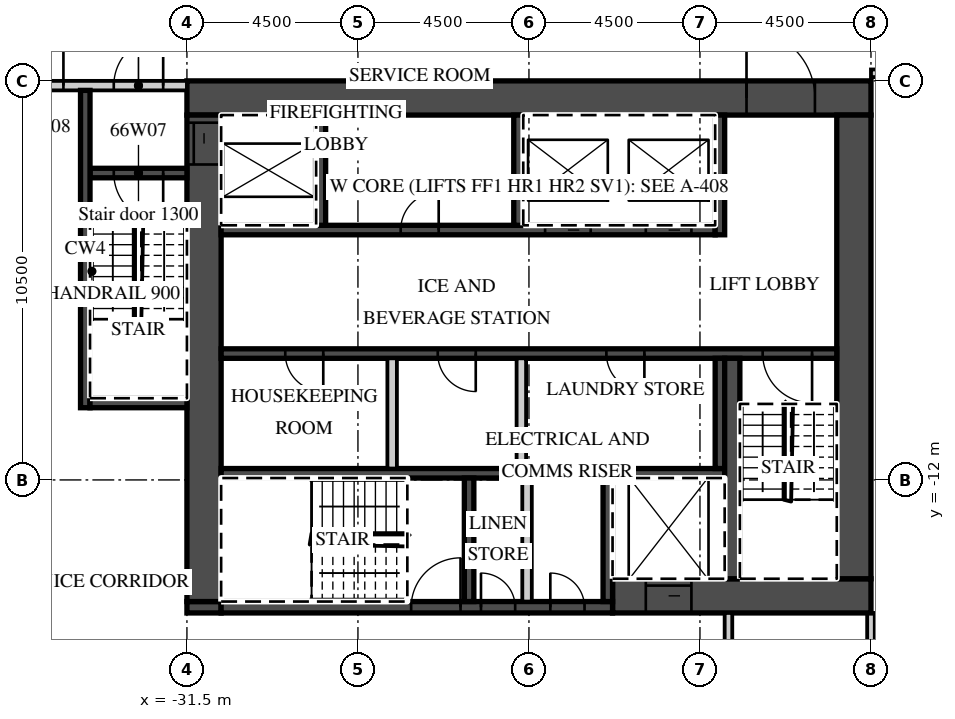
"""IFC4 building model, lengths in metres.
Left out: names, types, materials, properties, quantities, classifications, styles, units other than length and angle.
Written with IfcOpenShell. Run it as: python <this file> out.ifc"""

import sys

from ifc_helpers import new_model, si_unit, direction, frame, frame_2d, origin, place, context, subcontext, project, spatial, rectangle, extrude, element, fill, save


model = new_model("IFC4")
c1 = context("Model", 3, precision=1e-05, world=origin(), true_north=direction((0.0, 1.0)))
c2 = subcontext(c1, "Body", "Model", "MODEL_VIEW")
j1 = project(units=[si_unit("LENGTHUNIT", "METRE"), si_unit("PLANEANGLEUNIT", "RADIAN")], contexts=[c1])
p1 = place(None, origin())
s1 = spatial("IfcSite", under=j1, at=p1, CompositionType="ELEMENT")
p2 = place(p1, origin())
s2 = spatial("IfcBuilding", under=s1, at=p2, CompositionType="ELEMENT")
p3 = place(p2, frame((0.0, 0.0, 268.5)))
s3 = spatial("IfcBuildingStorey", under=s2, at=p3, CompositionType="ELEMENT", Elevation=268.5)
p4 = place(p3, frame((-13.5, -21.396, 0.0), z_axis=(0.0, 0.0, 1.0), x_axis=(0.0, 1.0, 0.0)))
e1 = element("IfcWall", 1, at=p4, inside=s3, PredefinedType="PARTITIONING", context=c2, shape_type="SweptSolid", body=[
    extrude(rectangle(XDim=5.896, YDim=0.2, at=frame_2d((2.948, 0.0))), origin(), (0.0, 0.0, 1.0), 3.02),
])
p5 = place(p3, frame((-13.5, -1.3, 0.0), z_axis=(0.0, 0.0, 1.0), x_axis=(1.0, 0.0, 0.0)))
e2 = element("IfcWall", 2, at=p5, inside=s3, PredefinedType="PARTITIONING", context=c2, shape_type="SweptSolid", body=[
    extrude(rectangle(XDim=50.293, YDim=0.2, at=frame_2d((25.146, 0.0))), origin(), (0.0, 0.0, 1.0), 3.02),
])
p6 = place(p5, frame((0.575, 0.0, 0.0)))
e3 = element("IfcOpeningElement", 3, at=p6, cuts=e2, PredefinedType="OPENING", context=c2, shape_type="SweptSolid", body=[
    extrude(rectangle(XDim=1.0, YDim=2.1, at=frame_2d((0.5, 1.05))), frame((0.0, 0.11, 0.0), z_axis=(0.0, -1.0, 0.0), x_axis=(1.0, 0.0, 0.0)), (0.0, 0.0, 1.0), 0.22),
])
p7 = place(p5, frame((6.938, 0.0, 0.0)))
e4 = element("IfcOpeningElement", 4, at=p7, cuts=e2, PredefinedType="OPENING", context=c2, shape_type="SweptSolid", body=[
    extrude(rectangle(XDim=1.2, YDim=2.1, at=frame_2d((0.6, 1.05))), frame((0.0, 0.11, 0.0), z_axis=(0.0, -1.0, 0.0), x_axis=(1.0, 0.0, 0.0)), (0.0, 0.0, 1.0), 0.22),
])
p8 = place(p5, frame((18.862, 0.0, 0.0)))
e5 = element("IfcOpeningElement", 5, at=p8, cuts=e2, PredefinedType="OPENING", context=c2, shape_type="SweptSolid", body=[
    extrude(rectangle(XDim=1.2, YDim=2.1, at=frame_2d((0.6, 1.05))), frame((0.0, 0.11, 0.0), z_axis=(0.0, -1.0, 0.0), x_axis=(1.0, 0.0, 0.0)), (0.0, 0.0, 1.0), 0.22),
])
p9 = place(p5, frame((24.938, 0.0, 0.0)))
e6 = element("IfcOpeningElement", 6, at=p9, cuts=e2, PredefinedType="OPENING", context=c2, shape_type="SweptSolid", body=[
    extrude(rectangle(XDim=1.2, YDim=2.1, at=frame_2d((0.6, 1.05))), frame((0.0, 0.11, 0.0), z_axis=(0.0, -1.0, 0.0), x_axis=(1.0, 0.0, 0.0)), (0.0, 0.0, 1.0), 0.22),
])
p10 = place(p5, frame((36.862, 0.0, 0.0)))
e7 = element("IfcOpeningElement", 7, at=p10, cuts=e2, PredefinedType="OPENING", context=c2, shape_type="SweptSolid", body=[
    extrude(rectangle(XDim=1.2, YDim=2.1, at=frame_2d((0.6, 1.05))), frame((0.0, 0.11, 0.0), z_axis=(0.0, -1.0, 0.0), x_axis=(1.0, 0.0, 0.0)), (0.0, 0.0, 1.0), 0.22),
])
p11 = place(p5, frame((43.45, 0.0, 0.0)))
e8 = element("IfcOpeningElement", 8, at=p11, cuts=e2, PredefinedType="OPENING", context=c2, shape_type="SweptSolid", body=[
    extrude(rectangle(XDim=1.0, YDim=2.1, at=frame_2d((0.5, 1.05))), frame((0.0, 0.11, 0.0), z_axis=(0.0, -1.0, 0.0), x_axis=(1.0, 0.0, 0.0)), (0.0, 0.0, 1.0), 0.22),
])
p12 = place(p5, frame((45.55, 0.0, 0.0)))
e9 = element("IfcOpeningElement", 9, at=p12, cuts=e2, PredefinedType="OPENING", context=c2, shape_type="SweptSolid", body=[
    extrude(rectangle(XDim=1.0, YDim=2.1, at=frame_2d((0.5, 1.05))), frame((0.0, 0.11, 0.0), z_axis=(0.0, -1.0, 0.0), x_axis=(1.0, 0.0, 0.0)), (0.0, 0.0, 1.0), 0.22),
])
p13 = place(p3, frame((-31.5, -1.95, 0.0), z_axis=(0.0, 0.0, 1.0), x_axis=(1.0, 0.0, 0.0)))
e10 = element("IfcWall", 10, at=p13, inside=s3, PredefinedType="SHEAR", context=c2, shape_type="SweptSolid", body=[
    extrude(rectangle(XDim=18.0, YDim=0.9, at=frame_2d((9.0, 0.0))), origin(), (0.0, 0.0, 1.0), 3.02),
])
p14 = place(p13, frame((14.725, 0.0, 0.0)))
e11 = element("IfcOpeningElement", 11, at=p14, cuts=e10, PredefinedType="OPENING", context=c2, shape_type="SweptSolid", body=[
    extrude(rectangle(XDim=1.8, YDim=2.1, at=frame_2d((0.9, 1.05))), frame((0.0, 0.46, 0.0), z_axis=(0.0, -1.0, 0.0), x_axis=(1.0, 0.0, 0.0)), (0.0, 0.0, 1.0), 0.92),
])
p15 = place(p3, frame((-20.3, -15.05, 0.0), z_axis=(0.0, 0.0, 1.0), x_axis=(1.0, 0.0, 0.0)))
e12 = element("IfcWall", 12, at=p15, inside=s3, PredefinedType="SHEAR", context=c2, shape_type="SweptSolid", body=[
    extrude(rectangle(XDim=6.8, YDim=0.9, at=frame_2d((3.4, 0.0))), origin(), (0.0, 0.0, 1.0), 3.02),
])
p16 = place(p15, frame((0.875, 0.0, 0.0)))
e13 = element("IfcOpeningElement", 13, at=p16, cuts=e12, PredefinedType="OPENING", context=c2, shape_type="SweptSolid", body=[
    extrude(rectangle(XDim=1.2, YDim=2.1, at=frame_2d((0.6, 1.05))), frame((0.0, 0.46, 0.0), z_axis=(0.0, -1.0, 0.0), x_axis=(1.0, 0.0, 0.0)), (0.0, 0.0, 1.0), 0.92),
])
p17 = place(p3, frame((-31.5, -15.35, 0.0), z_axis=(0.0, 0.0, 1.0), x_axis=(1.0, 0.0, 0.0)))
e14 = element("IfcWall", 14, at=p17, inside=s3, PredefinedType="SHEAR", context=c2, shape_type="SweptSolid", body=[
    extrude(rectangle(XDim=0.9, YDim=0.3, at=frame_2d((0.45, 0.0))), origin(), (0.0, 0.0, 1.0), 3.02),
])
p18 = place(p3, frame((-30.6, -15.35, 0.0), z_axis=(0.0, 0.0, 1.0), x_axis=(1.0, 0.0, 0.0)))
e15 = element("IfcWall", 15, at=p18, inside=s3, PredefinedType="SHEAR", context=c2, shape_type="SweptSolid", body=[
    extrude(rectangle(XDim=10.3, YDim=0.3, at=frame_2d((5.15, 0.0))), origin(), (0.0, 0.0, 1.0), 3.02),
])
p19 = place(p18, frame((5.0, 0.0, 0.0)))
e16 = element("IfcOpeningElement", 16, at=p19, cuts=e15, PredefinedType="OPENING", context=c2, shape_type="SweptSolid", body=[
    extrude(rectangle(XDim=1.3, YDim=2.1, at=frame_2d((0.65, 1.05))), frame((0.0, 0.16, 0.0), z_axis=(0.0, -1.0, 0.0), x_axis=(1.0, 0.0, 0.0)), (0.0, 0.0, 1.0), 0.32),
])
p20 = place(p18, frame((6.837, 0.0, 0.0)))
e17 = element("IfcOpeningElement", 17, at=p20, cuts=e15, PredefinedType="OPENING", context=c2, shape_type="SweptSolid", body=[
    extrude(rectangle(XDim=0.9, YDim=2.1, at=frame_2d((0.45, 1.05))), frame((0.0, 0.16, 0.0), z_axis=(0.0, -1.0, 0.0), x_axis=(1.0, 0.0, 0.0)), (0.0, 0.0, 1.0), 0.32),
])
p21 = place(p18, frame((8.663, 0.0, 0.0)))
e18 = element("IfcOpeningElement", 18, at=p21, cuts=e15, PredefinedType="OPENING", context=c2, shape_type="SweptSolid", body=[
    extrude(rectangle(XDim=0.9, YDim=2.1, at=frame_2d((0.45, 1.05))), frame((0.0, 0.16, 0.0), z_axis=(0.0, -1.0, 0.0), x_axis=(1.0, 0.0, 0.0)), (0.0, 0.0, 1.0), 0.32),
])
p22 = place(p3, frame((-31.05, -15.2, 0.0), z_axis=(0.0, 0.0, 1.0), x_axis=(0.0, 1.0, 0.0)))
e19 = element("IfcWall", 19, at=p22, inside=s3, PredefinedType="SHEAR", context=c2, shape_type="SweptSolid", body=[
    extrude(rectangle(XDim=12.8, YDim=0.9, at=frame_2d((6.4, 0.0))), origin(), (0.0, 0.0, 1.0), 3.02),
])
p23 = place(p22, frame((11.5, 0.0, 0.0)))
e20 = element("IfcOpeningElement", 20, at=p23, cuts=e19, PredefinedType="OPENING", context=c2, shape_type="SweptSolid", body=[
    extrude(rectangle(XDim=1.1, YDim=2.1, at=frame_2d((0.55, 1.05))), frame((0.0, 0.46, 0.0), z_axis=(0.0, -1.0, 0.0), x_axis=(1.0, 0.0, 0.0)), (0.0, 0.0, 1.0), 0.92),
])
p24 = place(p3, frame((-13.95, -14.6, 0.0), z_axis=(0.0, 0.0, 1.0), x_axis=(0.0, 1.0, 0.0)))
e21 = element("IfcWall", 21, at=p24, inside=s3, PredefinedType="SHEAR", context=c2, shape_type="SweptSolid", body=[
    extrude(rectangle(XDim=12.2, YDim=0.9, at=frame_2d((6.1, 0.0))), origin(), (0.0, 0.0, 1.0), 3.02),
])
p25 = place(p3, frame((-30.6, -5.425, 0.0), z_axis=(0.0, 0.0, 1.0), x_axis=(1.0, 0.0, 0.0)))
e22 = element("IfcWall", 22, at=p25, inside=s3, PredefinedType="SHEAR", context=c2, shape_type="SweptSolid", body=[
    extrude(rectangle(XDim=13.0, YDim=0.25, at=frame_2d((6.5, 0.0))), origin(), (0.0, 0.0, 1.0), 3.02),
])
p26 = place(p25, frame((8.525, 0.0, 0.0)))
e23 = element("IfcOpeningElement", 23, at=p26, cuts=e22, PredefinedType="OPENING", context=c2, shape_type="SweptSolid", body=[
    extrude(rectangle(XDim=1.2, YDim=2.1, at=frame_2d((0.6, 1.05))), frame((0.0, 0.135, 0.0), z_axis=(0.0, -1.0, 0.0), x_axis=(1.0, 0.0, 0.0)), (0.0, 0.0, 1.0), 0.27),
])
p27 = place(p25, frame((11.175, 0.0, 0.0)))
e24 = element("IfcOpeningElement", 24, at=p27, cuts=e22, PredefinedType="OPENING", context=c2, shape_type="SweptSolid", body=[
    extrude(rectangle(XDim=1.2, YDim=2.1, at=frame_2d((0.6, 1.05))), frame((0.0, 0.135, 0.0), z_axis=(0.0, -1.0, 0.0), x_axis=(1.0, 0.0, 0.0)), (0.0, 0.0, 1.0), 0.27),
])
p28 = place(p25, frame((4.725, 0.0, 0.0)))
e25 = element("IfcOpeningElement", 25, at=p28, cuts=e22, PredefinedType="OPENING", context=c2, shape_type="SweptSolid", body=[
    extrude(rectangle(XDim=1.0, YDim=2.1, at=frame_2d((0.5, 1.05))), frame((0.0, 0.135, 0.0), z_axis=(0.0, -1.0, 0.0), x_axis=(1.0, 0.0, 0.0)), (0.0, 0.0, 1.0), 0.27),
])
p29 = place(p3, frame((-17.475, -5.55, 0.0), z_axis=(0.0, 0.0, 1.0), x_axis=(0.0, 1.0, 0.0)))
e26 = element("IfcWall", 26, at=p29, inside=s3, PredefinedType="SHEAR", context=c2, shape_type="SweptSolid", body=[
    extrude(rectangle(XDim=3.15, YDim=0.25, at=frame_2d((1.575, 0.0))), origin(), (0.0, 0.0, 1.0), 3.02),
])
for number, where, z_axis, x_axis in (
    (27, (-27.975, -5.3, 0.0), (0.0, 0.0, 1.0), (0.0, 1.0, 0.0)),
    (28, (-22.775, -5.3, 0.0), (0.0, 0.0, 1.0), (0.0, 1.0, 0.0)),
):
    element("IfcWall", number, at=place(p3, frame(where, z_axis=z_axis, x_axis=x_axis)), inside=s3, PredefinedType="SHEAR", context=c2, shape_type="SweptSolid", body=[
        extrude(rectangle(XDim=2.9, YDim=0.25, at=frame_2d((1.45, 0.0))), origin(), (0.0, 0.0, 1.0), 3.02),
    ])
p30 = place(p3, frame((-30.6, -8.675, 0.0), z_axis=(0.0, 0.0, 1.0), x_axis=(1.0, 0.0, 0.0)))
e29 = element("IfcWall", 29, at=p30, inside=s3, PredefinedType="SHEAR", context=c2, shape_type="SweptSolid", body=[
    extrude(rectangle(XDim=16.2, YDim=0.25, at=frame_2d((8.1, 0.0))), origin(), (0.0, 0.0, 1.0), 3.02),
])
p31 = place(p30, frame((14.25, 0.0, 0.0)))
e30 = element("IfcOpeningElement", 30, at=p31, cuts=e29, PredefinedType="OPENING", context=c2, shape_type="SweptSolid", body=[
    extrude(rectangle(XDim=1.3, YDim=2.1, at=frame_2d((0.65, 1.05))), frame((0.0, 0.135, 0.0), z_axis=(0.0, -1.0, 0.0), x_axis=(1.0, 0.0, 0.0)), (0.0, 0.0, 1.0), 0.27),
])
p32 = place(p30, frame((1.688, 0.0, 0.0)))
e31 = element("IfcOpeningElement", 31, at=p32, cuts=e29, PredefinedType="OPENING", context=c2, shape_type="SweptSolid", body=[
    extrude(rectangle(XDim=1.0, YDim=2.1, at=frame_2d((0.5, 1.05))), frame((0.0, 0.135, 0.0), z_axis=(0.0, -1.0, 0.0), x_axis=(1.0, 0.0, 0.0)), (0.0, 0.0, 1.0), 0.27),
])
p33 = place(p30, frame((5.7, 0.0, 0.0)))
e32 = element("IfcOpeningElement", 32, at=p33, cuts=e29, PredefinedType="OPENING", context=c2, shape_type="SweptSolid", body=[
    extrude(rectangle(XDim=1.0, YDim=2.1, at=frame_2d((0.5, 1.05))), frame((0.0, 0.135, 0.0), z_axis=(0.0, -1.0, 0.0), x_axis=(1.0, 0.0, 0.0)), (0.0, 0.0, 1.0), 0.27),
])
p34 = place(p30, frame((10.137, 0.0, 0.0)))
e33 = element("IfcOpeningElement", 33, at=p34, cuts=e29, PredefinedType="OPENING", context=c2, shape_type="SweptSolid", body=[
    extrude(rectangle(XDim=1.0, YDim=2.1, at=frame_2d((0.5, 1.05))), frame((0.0, 0.135, 0.0), z_axis=(0.0, -1.0, 0.0), x_axis=(1.0, 0.0, 0.0)), (0.0, 0.0, 1.0), 0.27),
])
p35 = place(p3, frame((-30.6, -11.825, 0.0), z_axis=(0.0, 0.0, 1.0), x_axis=(1.0, 0.0, 0.0)))
e34 = element("IfcWall", 34, at=p35, inside=s3, PredefinedType="SHEAR", context=c2, shape_type="SweptSolid", body=[
    extrude(rectangle(XDim=13.25, YDim=0.25, at=frame_2d((6.625, 0.0))), origin(), (0.0, 0.0, 1.0), 3.02),
])
p36 = place(p3, frame((-17.475, -11.7, 0.0), z_axis=(0.0, 0.0, 1.0), x_axis=(0.0, 1.0, 0.0)))
e35 = element("IfcWall", 35, at=p36, inside=s3, PredefinedType="SHEAR", context=c2, shape_type="SweptSolid", body=[
    extrude(rectangle(XDim=2.9, YDim=0.25, at=frame_2d((1.45, 0.0))), origin(), (0.0, 0.0, 1.0), 3.02),
])
for number, where, z_axis, x_axis in (
    (36, (-26.1, -11.7, 0.0), (0.0, 0.0, 1.0), (0.0, 1.0, 0.0)),
    (37, (-22.7, -11.7, 0.0), (0.0, 0.0, 1.0), (0.0, 1.0, 0.0)),
):
    element("IfcWall", number, at=place(p3, frame(where, z_axis=z_axis, x_axis=x_axis)), inside=s3, PredefinedType="PARTITIONING", context=c2, shape_type="SweptSolid", body=[
        extrude(rectangle(XDim=2.9, YDim=0.25, at=frame_2d((1.45, 0.0))), origin(), (0.0, 0.0, 1.0), 3.02),
    ])
p37 = place(p3, frame((-17.15, -14.6, 0.0), z_axis=(0.0, 0.0, 1.0), x_axis=(0.0, 1.0, 0.0)))
e38 = element("IfcWall", 38, at=p37, inside=s3, PredefinedType="SHEAR", context=c2, shape_type="SweptSolid", body=[
    extrude(rectangle(XDim=5.8, YDim=0.4, at=frame_2d((2.9, 0.0))), origin(), (0.0, 0.0, 1.0), 3.02),
])
for number, where, z_axis, x_axis in (
    (39, (-20.425, -15.2, 0.0), (0.0, 0.0, 1.0), (0.0, 1.0, 0.0)),
    (40, (-24.075, -15.2, 0.0), (0.0, 0.0, 1.0), (0.0, 1.0, 0.0)),
):
    element("IfcWall", number, at=place(p3, frame(where, z_axis=z_axis, x_axis=x_axis)), inside=s3, PredefinedType="SHEAR", context=c2, shape_type="SweptSolid", body=[
        extrude(rectangle(XDim=3.25, YDim=0.25, at=frame_2d((1.625, 0.0))), origin(), (0.0, 0.0, 1.0), 3.02),
    ])
p38 = place(p3, frame((-22.55, -15.2, 0.0), z_axis=(0.0, 0.0, 1.0), x_axis=(0.0, 1.0, 0.0)))
e41 = element("IfcWall", 41, at=p38, inside=s3, PredefinedType="PARTITIONING", context=c2, shape_type="SweptSolid", body=[
    extrude(rectangle(XDim=3.25, YDim=0.25, at=frame_2d((1.625, 0.0))), origin(), (0.0, 0.0, 1.0), 3.02),
])
p39 = place(p3, frame((-39.627, -1.625, 0.0), z_axis=(0.0, 0.0, 1.0), x_axis=(1.0, 0.0, 0.0)))
e42 = element("IfcWall", 42, at=p39, inside=s3, PredefinedType="PARTITIONING", context=c2, shape_type="SweptSolid", body=[
    extrude(rectangle(XDim=8.127, YDim=0.25, at=frame_2d((4.063, 0.0))), origin(), (0.0, 0.0, 1.0), 3.02),
])
p40 = place(p39, frame((6.202, 0.0, 0.0)))
e43 = element("IfcOpeningElement", 43, at=p40, cuts=e42, PredefinedType="OPENING", context=c2, shape_type="SweptSolid", body=[
    extrude(rectangle(XDim=1.3, YDim=2.1, at=frame_2d((0.65, 1.05))), frame((0.0, 0.135, 0.0), z_axis=(0.0, -1.0, 0.0), x_axis=(1.0, 0.0, 0.0)), (0.0, 0.0, 1.0), 0.27),
])
p41 = place(p39, frame((3.777, 0.0, 0.0)))
e44 = element("IfcOpeningElement", 44, at=p41, cuts=e42, PredefinedType="OPENING", context=c2, shape_type="SweptSolid", body=[
    extrude(rectangle(XDim=1.1, YDim=2.1, at=frame_2d((0.55, 1.05))), frame((0.0, 0.135, 0.0), z_axis=(0.0, -1.0, 0.0), x_axis=(1.0, 0.0, 0.0)), (0.0, 0.0, 1.0), 0.27),
])
p42 = place(p3, frame((-34.05, -3.925, 0.0), z_axis=(0.0, 0.0, 1.0), x_axis=(1.0, 0.0, 0.0)))
e45 = element("IfcWall", 45, at=p42, inside=s3, PredefinedType="SHEAR", context=c2, shape_type="SweptSolid", body=[
    extrude(rectangle(XDim=2.55, YDim=0.25, at=frame_2d((1.275, 0.0))), origin(), (0.0, 0.0, 1.0), 3.02),
])
p43 = place(p42, frame((0.625, 0.0, 0.0)))
e46 = element("IfcOpeningElement", 46, at=p43, cuts=e45, PredefinedType="OPENING", context=c2, shape_type="SweptSolid", body=[
    extrude(rectangle(XDim=1.3, YDim=2.1, at=frame_2d((0.65, 1.05))), frame((0.0, 0.135, 0.0), z_axis=(0.0, -1.0, 0.0), x_axis=(1.0, 0.0, 0.0)), (0.0, 0.0, 1.0), 0.27),
])
p44 = place(p3, frame((-34.175, -10.1, 0.0), z_axis=(0.0, 0.0, 1.0), x_axis=(0.0, 1.0, 0.0)))
e47 = element("IfcWall", 47, at=p44, inside=s3, PredefinedType="SHEAR", context=c2, shape_type="SweptSolid", body=[
    extrude(rectangle(XDim=8.35, YDim=0.25, at=frame_2d((4.175, 0.0))), origin(), (0.0, 0.0, 1.0), 3.02),
])
p45 = place(p3, frame((-34.05, -9.975, 0.0), z_axis=(0.0, 0.0, 1.0), x_axis=(1.0, 0.0, 0.0)))
e48 = element("IfcWall", 48, at=p45, inside=s3, PredefinedType="SHEAR", context=c2, shape_type="SweptSolid", body=[
    extrude(rectangle(XDim=2.55, YDim=0.25, at=frame_2d((1.275, 0.0))), origin(), (0.0, 0.0, 1.0), 3.02),
])
p46 = place(p3, frame((-17.25, -17.7, 0.0), z_axis=(0.0, 0.0, 1.0), x_axis=(0.0, 1.0, 0.0)))
e49 = element("IfcWall", 49, at=p46, inside=s3, PredefinedType="PARTITIONING", context=c2, shape_type="SweptSolid", body=[
    extrude(rectangle(XDim=2.2, YDim=0.2, at=frame_2d((1.1, 0.0))), origin(), (0.0, 0.0, 1.0), 3.02),
])
p47 = place(p26, origin())
e50 = element("IfcDoor", 50, at=p47, inside=s3, OperationType="SLIDING_TO_LEFT", PredefinedType="DOOR", context=c2, shape_type="SweptSolid", body=[
    extrude(rectangle(XDim=1.2, YDim=2.1, at=frame_2d((0.6, 1.05))), frame((0.0, 0.025, 0.0), z_axis=(0.0, -1.0, 0.0), x_axis=(1.0, 0.0, 0.0)), (0.0, 0.0, 1.0), 0.05),
])
fill(e23, e50)
p48 = place(p27, origin())
e51 = element("IfcDoor", 51, at=p48, inside=s3, OperationType="SLIDING_TO_RIGHT", PredefinedType="DOOR", context=c2, shape_type="SweptSolid", body=[
    extrude(rectangle(XDim=1.2, YDim=2.1, at=frame_2d((0.6, 1.05))), frame((0.0, 0.025, 0.0), z_axis=(0.0, -1.0, 0.0), x_axis=(1.0, 0.0, 0.0)), (0.0, 0.0, 1.0), 0.05),
])
fill(e24, e51)
p49 = place(p16, origin())
e52 = element("IfcDoor", 52, at=p49, inside=s3, OperationType="SLIDING_TO_LEFT", PredefinedType="DOOR", context=c2, shape_type="SweptSolid", body=[
    extrude(rectangle(XDim=1.2, YDim=2.1, at=frame_2d((0.6, 1.05))), frame((0.0, 0.025, 0.0), z_axis=(0.0, -1.0, 0.0), x_axis=(1.0, 0.0, 0.0)), (0.0, 0.0, 1.0), 0.05),
])
fill(e13, e52)
p50 = place(p23, origin())
e53 = element("IfcDoor", 53, at=p50, inside=s3, OperationType="SLIDING_TO_RIGHT", PredefinedType="DOOR", context=c2, shape_type="SweptSolid", body=[
    extrude(rectangle(XDim=1.1, YDim=2.1, at=frame_2d((0.55, 1.05))), frame((0.0, 0.025, 0.0), z_axis=(0.0, -1.0, 0.0), x_axis=(1.0, 0.0, 0.0)), (0.0, 0.0, 1.0), 0.05),
])
fill(e20, e53)
p51 = place(p14, origin())
e54 = element("IfcDoor", 54, at=p51, inside=s3, OperationType="DOUBLE_DOOR_DOUBLE_SWING", PredefinedType="DOOR", context=c2, shape_type="SweptSolid", body=[
    extrude(rectangle(XDim=1.8, YDim=2.1, at=frame_2d((0.9, 1.05))), frame((0.0, 0.025, 0.0), z_axis=(0.0, -1.0, 0.0), x_axis=(1.0, 0.0, 0.0)), (0.0, 0.0, 1.0), 0.05),
])
fill(e11, e54)
p52 = place(p40, origin())
e55 = element("IfcDoor", 55, at=p52, inside=s3, OperationType="SINGLE_SWING_RIGHT", PredefinedType="DOOR", context=c2, shape_type="SweptSolid", body=[
    extrude(rectangle(XDim=1.3, YDim=2.1, at=frame_2d((0.65, 1.05))), frame((0.0, 0.025, 0.0), z_axis=(0.0, -1.0, 0.0), x_axis=(1.0, 0.0, 0.0)), (0.0, 0.0, 1.0), 0.05),
])
fill(e43, e55)
p53 = place(p43, origin())
e56 = element("IfcDoor", 56, at=p53, inside=s3, OperationType="SINGLE_SWING_RIGHT", PredefinedType="DOOR", context=c2, shape_type="SweptSolid", body=[
    extrude(rectangle(XDim=1.3, YDim=2.1, at=frame_2d((0.65, 1.05))), frame((0.0, 0.025, 0.0), z_axis=(0.0, -1.0, 0.0), x_axis=(1.0, 0.0, 0.0)), (0.0, 0.0, 1.0), 0.05),
])
fill(e46, e56)
p54 = place(p41, origin())
e57 = element("IfcDoor", 57, at=p54, inside=s3, OperationType="SINGLE_SWING_RIGHT", PredefinedType="DOOR", context=c2, shape_type="SweptSolid", body=[
    extrude(rectangle(XDim=1.1, YDim=2.1, at=frame_2d((0.55, 1.05))), frame((0.0, 0.025, 0.0), z_axis=(0.0, -1.0, 0.0), x_axis=(1.0, 0.0, 0.0)), (0.0, 0.0, 1.0), 0.05),
])
fill(e44, e57)
p55 = place(p31, origin())
e58 = element("IfcDoor", 58, at=p55, inside=s3, OperationType="SINGLE_SWING_RIGHT", PredefinedType="DOOR", context=c2, shape_type="SweptSolid", body=[
    extrude(rectangle(XDim=1.3, YDim=2.1, at=frame_2d((0.65, 1.05))), frame((0.0, 0.025, 0.0), z_axis=(0.0, -1.0, 0.0), x_axis=(1.0, 0.0, 0.0)), (0.0, 0.0, 1.0), 0.05),
])
fill(e30, e58)
p56 = place(p19, origin())
e59 = element("IfcDoor", 59, at=p56, inside=s3, OperationType="SINGLE_SWING_RIGHT", PredefinedType="DOOR", context=c2, shape_type="SweptSolid", body=[
    extrude(rectangle(XDim=1.3, YDim=2.1, at=frame_2d((0.65, 1.05))), frame((0.0, 0.025, 0.0), z_axis=(0.0, -1.0, 0.0), x_axis=(1.0, 0.0, 0.0)), (0.0, 0.0, 1.0), 0.05),
])
fill(e16, e59)
p57 = place(p20, origin())
e60 = element("IfcDoor", 60, at=p57, inside=s3, OperationType="SINGLE_SWING_LEFT", PredefinedType="DOOR", context=c2, shape_type="SweptSolid", body=[
    extrude(rectangle(XDim=0.9, YDim=2.1, at=frame_2d((0.45, 1.05))), frame((0.0, 0.025, 0.0), z_axis=(0.0, -1.0, 0.0), x_axis=(1.0, 0.0, 0.0)), (0.0, 0.0, 1.0), 0.05),
])
fill(e17, e60)
p58 = place(p21, origin())
e61 = element("IfcDoor", 61, at=p58, inside=s3, OperationType="SINGLE_SWING_LEFT", PredefinedType="DOOR", context=c2, shape_type="SweptSolid", body=[
    extrude(rectangle(XDim=0.9, YDim=2.1, at=frame_2d((0.45, 1.05))), frame((0.0, 0.025, 0.0), z_axis=(0.0, -1.0, 0.0), x_axis=(1.0, 0.0, 0.0)), (0.0, 0.0, 1.0), 0.05),
])
fill(e18, e61)
p59 = place(p32, origin())
e62 = element("IfcDoor", 62, at=p59, inside=s3, OperationType="SINGLE_SWING_RIGHT", PredefinedType="DOOR", context=c2, shape_type="SweptSolid", body=[
    extrude(rectangle(XDim=1.0, YDim=2.1, at=frame_2d((0.5, 1.05))), frame((0.0, 0.025, 0.0), z_axis=(0.0, -1.0, 0.0), x_axis=(1.0, 0.0, 0.0)), (0.0, 0.0, 1.0), 0.05),
])
fill(e31, e62)
p60 = place(p33, origin())
e63 = element("IfcDoor", 63, at=p60, inside=s3, OperationType="SINGLE_SWING_RIGHT", PredefinedType="DOOR", context=c2, shape_type="SweptSolid", body=[
    extrude(rectangle(XDim=1.0, YDim=2.1, at=frame_2d((0.5, 1.05))), frame((0.0, 0.025, 0.0), z_axis=(0.0, -1.0, 0.0), x_axis=(1.0, 0.0, 0.0)), (0.0, 0.0, 1.0), 0.05),
])
fill(e32, e63)
p61 = place(p34, origin())
e64 = element("IfcDoor", 64, at=p61, inside=s3, OperationType="SINGLE_SWING_RIGHT", PredefinedType="DOOR", context=c2, shape_type="SweptSolid", body=[
    extrude(rectangle(XDim=1.0, YDim=2.1, at=frame_2d((0.5, 1.05))), frame((0.0, 0.025, 0.0), z_axis=(0.0, -1.0, 0.0), x_axis=(1.0, 0.0, 0.0)), (0.0, 0.0, 1.0), 0.05),
])
fill(e33, e64)
p62 = place(p28, origin())
e65 = element("IfcDoor", 65, at=p62, inside=s3, OperationType="SINGLE_SWING_RIGHT", PredefinedType="DOOR", context=c2, shape_type="SweptSolid", body=[
    extrude(rectangle(XDim=1.0, YDim=2.1, at=frame_2d((0.5, 1.05))), frame((0.0, 0.025, 0.0), z_axis=(0.0, -1.0, 0.0), x_axis=(1.0, 0.0, 0.0)), (0.0, 0.0, 1.0), 0.05),
])
fill(e25, e65)
save(model, sys.argv[1])
